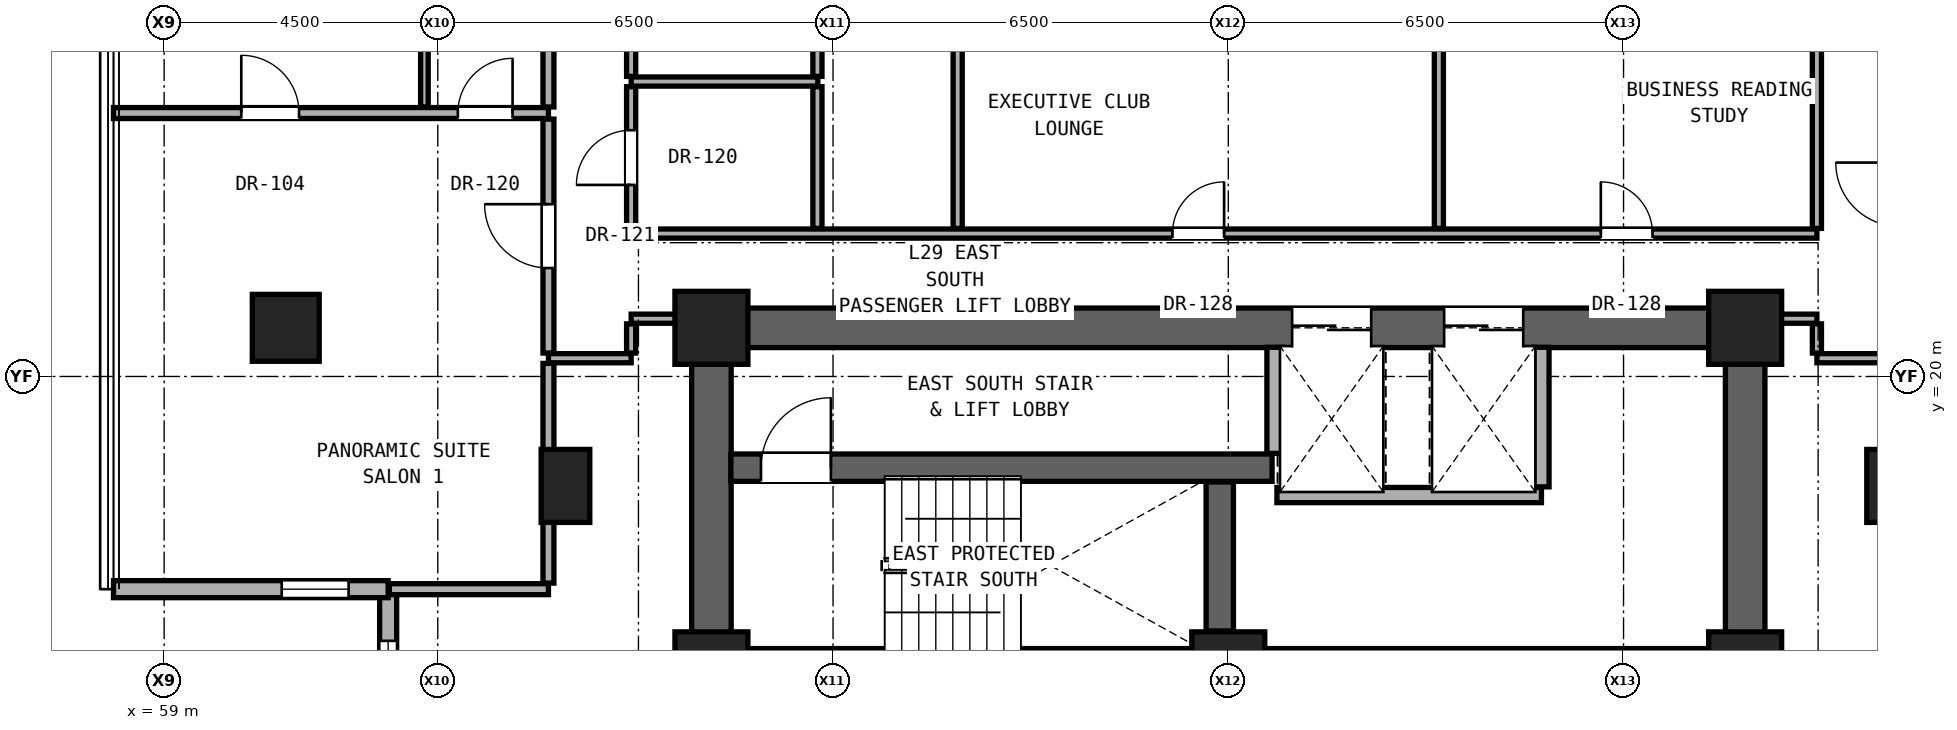
"""IFC4 building model, lengths in metres.
Left out: names, types, materials, properties, quantities, classifications, styles, units other than length and angle.
Written with IfcOpenShell. Run it as: python <this file> out.ifc"""

import sys

from ifc_helpers import new_model, si_unit, direction, frame, frame_2d, origin, origin_2d, place, context, subcontext, project, spatial, rectangle, hollow_rectangle, extrude, element, fill, save


model = new_model("IFC4")
c1 = context("Model", 3, precision=1e-05, world=origin(), true_north=direction((0.0, 1.0)))
c2 = subcontext(c1, "Body", "Model", "MODEL_VIEW")
j1 = project(units=[si_unit("LENGTHUNIT", "METRE"), si_unit("PLANEANGLEUNIT", "RADIAN")], contexts=[c1])
p1 = place(None, origin())
s1 = spatial("IfcSite", under=j1, at=p1, CompositionType="ELEMENT")
p2 = place(p1, origin())
s2 = spatial("IfcBuilding", under=s1, at=p2, CompositionType="ELEMENT")
p3 = place(p2, frame((0.0, 0.0, 104.9)))
s3 = spatial("IfcBuildingStorey", under=s2, at=p3, CompositionType="ELEMENT", Elevation=104.9)
for number, where, z_axis, x_axis in (
    (1, (68.0, 15.2, 0.0), (0.0, 0.0, 1.0), (1.0, 0.0, 0.0)),
    (2, (76.5, 15.2, 0.0), (0.0, 0.0, 1.0), (1.0, 0.0, 0.0)),
    (3, (85.0, 15.2, 0.0), (0.0, 0.0, 1.0), (1.0, 0.0, 0.0)),
    (4, (68.0, 20.8, 0.0), (0.0, 0.0, 1.0), (1.0, 0.0, 0.0)),
    (5, (85.0, 20.8, 0.0), (0.0, 0.0, 1.0), (1.0, 0.0, 0.0)),
):
    element("IfcColumn", number, at=place(p3, frame(where, z_axis=z_axis, x_axis=x_axis)), inside=s3, PredefinedType="COLUMN", context=c2, shape_type="SweptSolid", body=[
        extrude(rectangle(XDim=1.2, YDim=1.2, at=origin_2d()), origin(), (0.0, 0.0, 1.0), 3.3),
    ])
p4 = place(p3, frame((61.0, 20.8, 0.0), z_axis=(0.0, 0.0, 1.0), x_axis=(1.0, 0.0, 0.0)))
e6 = element("IfcColumn", 6, at=p4, inside=s3, PredefinedType="COLUMN", context=c2, shape_type="SweptSolid", body=[
    extrude(hollow_rectangle(XDim=1.1, YDim=1.1, WallThickness=0.06, at=origin_2d()), origin(), (0.0, 0.0, 1.0), 3.3),
])
for number, where, z_axis, x_axis in (
    (7, (65.6, 18.2, 0.0), (0.0, 0.0, 1.0), (1.0, 0.0, 0.0)),
    (8, (87.4, 18.2, 0.0), (0.0, 0.0, 1.0), (1.0, 0.0, 0.0)),
):
    element("IfcColumn", number, at=place(p3, frame(where, z_axis=z_axis, x_axis=x_axis)), inside=s3, PredefinedType="PILASTER", context=c2, shape_type="SweptSolid", body=[
        extrude(rectangle(XDim=0.8, YDim=1.2, at=origin_2d()), origin(), (0.0, 0.0, 1.0), 3.3),
    ])
p5 = place(p3, frame((68.0, 15.2, 0.0), z_axis=(0.0, 0.0, 1.0), x_axis=(1.0, 0.0, 0.0)))
e9 = element("IfcWall", 9, at=p5, inside=s3, PredefinedType="SHEAR", context=c2, shape_type="SweptSolid", body=[
    extrude(rectangle(XDim=17.0, YDim=0.65, at=frame_2d((8.5, 0.0))), origin(), (0.0, 0.0, 1.0), 3.08),
])
for number, where, z_axis, x_axis in (
    (10, (68.0, 15.2, 0.0), (0.0, 0.0, 1.0), (0.0, 1.0, 0.0)),
    (11, (85.0, 15.2, 0.0), (0.0, 0.0, 1.0), (0.0, 1.0, 0.0)),
):
    element("IfcWall", number, at=place(p3, frame(where, z_axis=z_axis, x_axis=x_axis)), inside=s3, PredefinedType="SHEAR", context=c2, shape_type="SweptSolid", body=[
        extrude(rectangle(XDim=5.6, YDim=0.65, at=frame_2d((2.8, 0.0))), origin(), (0.0, 0.0, 1.0), 3.08),
    ])
p6 = place(p3, frame((68.0, 20.8, 0.0), z_axis=(0.0, 0.0, 1.0), x_axis=(1.0, 0.0, 0.0)))
e12 = element("IfcWall", 12, at=p6, inside=s3, PredefinedType="SHEAR", context=c2, shape_type="SweptSolid", body=[
    extrude(rectangle(XDim=17.0, YDim=0.65, at=frame_2d((8.5, 0.0))), origin(), (0.0, 0.0, 1.0), 3.08),
])
p7 = place(p6, frame((9.55, 0.0, 0.0)))
e13 = element("IfcOpeningElement", 13, at=p7, cuts=e12, PredefinedType="OPENING", context=c2, shape_type="SweptSolid", body=[
    extrude(rectangle(XDim=1.3, YDim=2.3, at=frame_2d((0.65, 1.15))), frame((0.0, 0.335, 0.0), z_axis=(0.0, -1.0, 0.0), x_axis=(1.0, 0.0, 0.0)), (0.0, 0.0, 1.0), 0.67),
])
p8 = place(p6, frame((12.05, 0.0, 0.0)))
e14 = element("IfcOpeningElement", 14, at=p8, cuts=e12, PredefinedType="OPENING", context=c2, shape_type="SweptSolid", body=[
    extrude(rectangle(XDim=1.3, YDim=2.3, at=frame_2d((0.65, 1.15))), frame((0.0, 0.335, 0.0), z_axis=(0.0, -1.0, 0.0), x_axis=(1.0, 0.0, 0.0)), (0.0, 0.0, 1.0), 0.67),
])
p9 = place(p3, frame((62.684, 16.502, 0.0), z_axis=(0.0, 0.0, 1.0), x_axis=(0.0, -1.0, 0.0)))
e15 = element("IfcWall", 15, at=p9, inside=s3, PredefinedType="SOLIDWALL", context=c2, shape_type="SweptSolid", body=[
    extrude(rectangle(XDim=4.516, YDim=0.28, at=frame_2d((2.258, 0.0))), origin(), (0.0, 0.0, 1.0), 3.06),
])
p10 = place(p9, frame((0.85, 0.0, 0.81)))
e16 = element("IfcOpeningElement", 16, at=p10, cuts=e15, PredefinedType="OPENING", context=c2, shape_type="SweptSolid", body=[
    extrude(rectangle(XDim=1.2, YDim=2.1, at=frame_2d((0.6, 1.05))), frame((0.0, 0.15, 0.0), z_axis=(0.0, -1.0, 0.0), x_axis=(1.0, 0.0, 0.0)), (0.0, 0.0, 1.0), 0.3),
])
p11 = place(p3, frame((58.167, 16.502, 0.0), z_axis=(0.0, 0.0, 1.0), x_axis=(1.0, 0.0, 0.0)))
e17 = element("IfcWall", 17, at=p11, inside=s3, PredefinedType="SOLIDWALL", context=c2, shape_type="SweptSolid", body=[
    extrude(rectangle(XDim=4.516, YDim=0.28, at=frame_2d((2.258, 0.0))), origin(), (0.0, 0.0, 1.0), 3.06),
])
p12 = place(p11, frame((2.766, 0.0, 0.85)))
e18 = element("IfcOpeningElement", 18, at=p12, cuts=e17, PredefinedType="OPENING", context=c2, shape_type="SweptSolid", body=[
    extrude(rectangle(XDim=1.1, YDim=2.0, at=frame_2d((0.55, 1.0))), frame((0.0, 0.15, 0.0), z_axis=(0.0, -1.0, 0.0), x_axis=(1.0, 0.0, 0.0)), (0.0, 0.0, 1.0), 0.3),
])
p13 = place(p3, frame((62.704, 16.502, 0.0), z_axis=(0.0, 0.0, 1.0), x_axis=(1.0, 0.0, 0.0)))
e19 = element("IfcWall", 19, at=p13, inside=s3, PredefinedType="PARTITIONING", context=c2, shape_type="SweptSolid", body=[
    extrude(rectangle(XDim=2.616, YDim=0.18, at=frame_2d((1.308, 0.0))), origin(), (0.0, 0.0, 1.0), 3.08),
])
p14 = place(p3, frame((77.3, 18.05, 0.0), z_axis=(0.0, 0.0, 1.0), x_axis=(1.0, 0.0, 0.0)))
e20 = element("IfcWall", 20, at=p14, inside=s3, PredefinedType="SOLIDWALL", context=c2, shape_type="SweptSolid", body=[
    extrude(rectangle(XDim=4.35, YDim=0.25, at=frame_2d((2.175, 0.0))), origin(), (0.0, 0.0, 1.0), 3.08),
])
p15 = place(p3, frame((68.32, 18.5, 0.0), z_axis=(0.0, 0.0, 1.0), x_axis=(1.0, 0.0, 0.0)))
e21 = element("IfcWall", 21, at=p15, inside=s3, PredefinedType="SHEAR", context=c2, shape_type="SweptSolid", body=[
    extrude(rectangle(XDim=8.9, YDim=0.45, at=frame_2d((4.45, 0.0))), origin(), (0.0, 0.0, 1.0), 3.08),
])
p16 = place(p15, frame((0.495, 0.0, 0.0)))
e22 = element("IfcOpeningElement", 22, at=p16, cuts=e21, PredefinedType="OPENING", context=c2, shape_type="SweptSolid", body=[
    extrude(rectangle(XDim=1.15, YDim=2.2, at=frame_2d((0.575, 1.1))), frame((0.0, 0.235, 0.0), z_axis=(0.0, -1.0, 0.0), x_axis=(1.0, 0.0, 0.0)), (0.0, 0.0, 1.0), 0.47),
])
p17 = place(p3, frame((65.32, 20.3, 0.0), z_axis=(0.0, 0.0, 1.0), x_axis=(1.0, 0.0, 0.0)))
e23 = element("IfcWall", 23, at=p17, inside=s3, PredefinedType="PARTITIONING", context=c2, shape_type="SweptSolid", body=[
    extrude(rectangle(XDim=1.36, YDim=0.15, at=frame_2d((0.68, 0.0))), origin(), (0.0, 0.0, 1.0), 3.08),
])
p18 = place(p3, frame((86.18, 20.3, 0.0), z_axis=(0.0, 0.0, 1.0), x_axis=(1.0, 0.0, 0.0)))
e24 = element("IfcWall", 24, at=p18, inside=s3, PredefinedType="PARTITIONING", context=c2, shape_type="SweptSolid", body=[
    extrude(rectangle(XDim=1.36, YDim=0.15, at=frame_2d((0.68, 0.0))), origin(), (0.0, 0.0, 1.0), 3.08),
])
p19 = place(p3, frame((66.68, 20.95, 0.0), z_axis=(0.0, 0.0, 1.0), x_axis=(1.0, 0.0, 0.0)))
e25 = element("IfcWall", 25, at=p19, inside=s3, PredefinedType="PARTITIONING", context=c2, shape_type="SweptSolid", body=[
    extrude(rectangle(XDim=1.0, YDim=0.15, at=frame_2d((0.5, 0.0))), origin(), (0.0, 0.0, 1.0), 2.472),
])
p20 = place(p3, frame((85.32, 20.95, 0.0), z_axis=(0.0, 0.0, 1.0), x_axis=(1.0, 0.0, 0.0)))
e26 = element("IfcWall", 26, at=p20, inside=s3, PredefinedType="PARTITIONING", context=c2, shape_type="SweptSolid", body=[
    extrude(rectangle(XDim=0.86, YDim=0.15, at=frame_2d((0.43, 0.0))), origin(), (0.0, 0.0, 1.0), 2.472),
])
p21 = place(p3, frame((66.68, 22.35, 0.0), z_axis=(0.0, 0.0, 1.0), x_axis=(1.0, 0.0, 0.0)))
e27 = element("IfcWall", 27, at=p21, inside=s3, PredefinedType="PARTITIONING", context=c2, shape_type="SweptSolid", body=[
    extrude(rectangle(XDim=19.5, YDim=0.15, at=frame_2d((9.75, 0.0))), origin(), (0.0, 0.0, 1.0), 2.145),
])
p22 = place(p21, frame((8.902, 0.0, 0.0)))
e28 = element("IfcOpeningElement", 28, at=p22, cuts=e27, PredefinedType="OPENING", context=c2, shape_type="SweptSolid", body=[
    extrude(rectangle(XDim=0.85, YDim=2.01, at=frame_2d((0.425, 1.005))), frame((0.0, 0.085, 0.0), z_axis=(0.0, -1.0, 0.0), x_axis=(1.0, 0.0, 0.0)), (0.0, 0.0, 1.0), 0.17),
])
p23 = place(p21, frame((15.947, 0.0, 0.0)))
e29 = element("IfcOpeningElement", 29, at=p23, cuts=e27, PredefinedType="OPENING", context=c2, shape_type="SweptSolid", body=[
    extrude(rectangle(XDim=0.85, YDim=2.01, at=frame_2d((0.425, 1.005))), frame((0.0, 0.085, 0.0), z_axis=(0.0, -1.0, 0.0), x_axis=(1.0, 0.0, 0.0)), (0.0, 0.0, 1.0), 0.17),
])
p24 = place(p3, frame((58.167, 24.332, 0.0), z_axis=(0.0, 0.0, 1.0), x_axis=(1.0, 0.0, 0.0)))
e30 = element("IfcWall", 30, at=p24, inside=s3, PredefinedType="PARTITIONING", context=c2, shape_type="SweptSolid", body=[
    extrude(rectangle(XDim=7.153, YDim=0.18, at=frame_2d((3.577, 0.0))), origin(), (0.0, 0.0, 1.0), 2.216),
])
p25 = place(p24, frame((2.102, 0.0, 0.0)))
e31 = element("IfcOpeningElement", 31, at=p25, cuts=e30, PredefinedType="OPENING", context=c2, shape_type="SweptSolid", body=[
    extrude(rectangle(XDim=0.95, YDim=2.15, at=frame_2d((0.475, 1.075))), frame((0.0, 0.1, 0.0), z_axis=(0.0, -1.0, 0.0), x_axis=(1.0, 0.0, 0.0)), (0.0, 0.0, 1.0), 0.2),
])
p26 = place(p24, frame((5.663, 0.0, 0.0)))
e32 = element("IfcOpeningElement", 32, at=p26, cuts=e30, PredefinedType="OPENING", context=c2, shape_type="SweptSolid", body=[
    extrude(rectangle(XDim=0.9, YDim=2.1, at=frame_2d((0.45, 1.05))), frame((0.0, 0.1, 0.0), z_axis=(0.0, -1.0, 0.0), x_axis=(1.0, 0.0, 0.0)), (0.0, 0.0, 1.0), 0.2),
])
p27 = place(p3, frame((66.68, 24.85, 0.0), z_axis=(0.0, 0.0, 1.0), x_axis=(1.0, 0.0, 0.0)))
e33 = element("IfcWall", 33, at=p27, inside=s3, PredefinedType="PARTITIONING", context=c2, shape_type="SweptSolid", body=[
    extrude(rectangle(XDim=3.07, YDim=0.15, at=frame_2d((1.535, 0.0))), origin(), (0.0, 0.0, 1.0), 2.145),
])
p28 = place(p3, frame((63.28, 24.432, 0.0), z_axis=(0.0, 0.0, 1.0), x_axis=(0.0, 1.0, 0.0)))
e34 = element("IfcWall", 34, at=p28, inside=s3, PredefinedType="PARTITIONING", context=c2, shape_type="SweptSolid", body=[
    extrude(rectangle(XDim=2.128, YDim=0.125, at=frame_2d((1.064, 0.0))), origin(), (0.0, 0.0, 1.0), 3.08),
])
p29 = place(p3, frame((65.32, 16.602, 0.0), z_axis=(0.0, 0.0, 1.0), x_axis=(0.0, 1.0, 0.0)))
e35 = element("IfcWall", 35, at=p29, inside=s3, PredefinedType="PARTITIONING", context=c2, shape_type="SweptSolid", body=[
    extrude(rectangle(XDim=3.613, YDim=0.18, at=frame_2d((1.807, 0.0))), origin(), (0.0, 0.0, 1.0), 2.456),
])
p30 = place(p3, frame((65.32, 20.385, 0.0), z_axis=(0.0, 0.0, 1.0), x_axis=(0.0, 1.0, 0.0)))
e36 = element("IfcWall", 36, at=p30, inside=s3, PredefinedType="PARTITIONING", context=c2, shape_type="SweptSolid", body=[
    extrude(rectangle(XDim=3.847, YDim=0.18, at=frame_2d((1.923, 0.0))), origin(), (0.0, 0.0, 1.0), 2.472),
])
p31 = place(p30, frame((1.398, 0.0, 0.0)))
e37 = element("IfcOpeningElement", 37, at=p31, cuts=e36, PredefinedType="OPENING", context=c2, shape_type="SweptSolid", body=[
    extrude(rectangle(XDim=1.05, YDim=2.2, at=frame_2d((0.525, 1.1))), frame((0.0, 0.1, 0.0), z_axis=(0.0, -1.0, 0.0), x_axis=(1.0, 0.0, 0.0)), (0.0, 0.0, 1.0), 0.2),
])
p32 = place(p3, frame((65.32, 24.432, 0.0), z_axis=(0.0, 0.0, 1.0), x_axis=(0.0, 1.0, 0.0)))
e38 = element("IfcWall", 38, at=p32, inside=s3, PredefinedType="PARTITIONING", context=c2, shape_type="SweptSolid", body=[
    extrude(rectangle(XDim=2.128, YDim=0.18, at=frame_2d((1.064, 0.0))), origin(), (0.0, 0.0, 1.0), 3.08),
])
p33 = place(p3, frame((66.68, 20.385, 0.0), z_axis=(0.0, 0.0, 1.0), x_axis=(0.0, 1.0, 0.0)))
e39 = element("IfcWall", 39, at=p33, inside=s3, PredefinedType="PARTITIONING", context=c2, shape_type="SweptSolid", body=[
    extrude(rectangle(XDim=0.48, YDim=0.15, at=frame_2d((0.24, 0.0))), origin(), (0.0, 0.0, 1.0), 2.472),
])
p34 = place(p3, frame((66.68, 22.435, 0.0), z_axis=(0.0, 0.0, 1.0), x_axis=(0.0, 1.0, 0.0)))
e40 = element("IfcWall", 40, at=p34, inside=s3, PredefinedType="PARTITIONING", context=c2, shape_type="SweptSolid", body=[
    extrude(rectangle(XDim=2.33, YDim=0.15, at=frame_2d((1.165, 0.0))), origin(), (0.0, 0.0, 1.0), 3.08),
])
p35 = place(p34, frame((0.715, 0.0, 0.0)))
e41 = element("IfcOpeningElement", 41, at=p35, cuts=e40, PredefinedType="OPENING", context=c2, shape_type="SweptSolid", body=[
    extrude(rectangle(XDim=0.9, YDim=2.1, at=frame_2d((0.45, 1.05))), frame((0.0, 0.085, 0.0), z_axis=(0.0, -1.0, 0.0), x_axis=(1.0, 0.0, 0.0)), (0.0, 0.0, 1.0), 0.17),
])
p36 = place(p3, frame((66.68, 24.935, 0.0), z_axis=(0.0, 0.0, 1.0), x_axis=(0.0, 1.0, 0.0)))
e42 = element("IfcWall", 42, at=p36, inside=s3, PredefinedType="PARTITIONING", context=c2, shape_type="SweptSolid", body=[
    extrude(rectangle(XDim=5.63, YDim=0.15, at=frame_2d((2.815, 0.0))), origin(), (0.0, 0.0, 1.0), 2.299),
])
p37 = place(p36, frame((2.34, 0.0, 0.0)))
e43 = element("IfcOpeningElement", 43, at=p37, cuts=e42, PredefinedType="OPENING", context=c2, shape_type="SweptSolid", body=[
    extrude(rectangle(XDim=0.95, YDim=2.15, at=frame_2d((0.475, 1.075))), frame((0.0, 0.085, 0.0), z_axis=(0.0, -1.0, 0.0), x_axis=(1.0, 0.0, 0.0)), (0.0, 0.0, 1.0), 0.17),
])
p38 = place(p3, frame((69.743, 22.435, 0.0), z_axis=(0.0, 0.0, 1.0), x_axis=(0.0, 1.0, 0.0)))
e44 = element("IfcWall", 44, at=p38, inside=s3, PredefinedType="PARTITIONING", context=c2, shape_type="SweptSolid", body=[
    extrude(rectangle(XDim=2.33, YDim=0.15, at=frame_2d((1.165, 0.0))), origin(), (0.0, 0.0, 1.0), 3.08),
])
p39 = place(p3, frame((69.743, 24.935, 0.0), z_axis=(0.0, 0.0, 1.0), x_axis=(0.0, 1.0, 0.0)))
e45 = element("IfcWall", 45, at=p39, inside=s3, PredefinedType="PARTITIONING", context=c2, shape_type="SweptSolid", body=[
    extrude(rectangle(XDim=5.63, YDim=0.15, at=frame_2d((2.815, 0.0))), origin(), (0.0, 0.0, 1.0), 2.145),
])
p40 = place(p3, frame((72.05, 22.435, 0.0), z_axis=(0.0, 0.0, 1.0), x_axis=(0.0, 1.0, 0.0)))
e46 = element("IfcWall", 46, at=p40, inside=s3, PredefinedType="PARTITIONING", context=c2, shape_type="SweptSolid", body=[
    extrude(rectangle(XDim=3.565, YDim=0.15, at=frame_2d((1.782, 0.0))), origin(), (0.0, 0.0, 1.0), 2.609),
])
p41 = place(p3, frame((76.36, 15.815, 0.0), z_axis=(0.0, 0.0, 1.0), x_axis=(0.0, 1.0, 0.0)))
e47 = element("IfcWall", 47, at=p41, inside=s3, PredefinedType="SHEAR", context=c2, shape_type="SweptSolid", body=[
    extrude(rectangle(XDim=2.45, YDim=0.45, at=frame_2d((1.225, 0.0))), origin(), (0.0, 0.0, 1.0), 3.08),
])
p42 = place(p3, frame((77.26, 18.735, 0.0), z_axis=(0.0, 0.0, 1.0), x_axis=(0.0, 1.0, 0.0)))
e48 = element("IfcWall", 48, at=p42, inside=s3, PredefinedType="SOLIDWALL", context=c2, shape_type="SweptSolid", body=[
    extrude(rectangle(XDim=1.745, YDim=0.25, at=frame_2d((0.873, 0.0))), origin(), (0.0, 0.0, 1.0), 3.08),
])
p43 = place(p3, frame((79.963, 22.435, 0.0), z_axis=(0.0, 0.0, 1.0), x_axis=(0.0, 1.0, 0.0)))
e49 = element("IfcWall", 49, at=p43, inside=s3, PredefinedType="PARTITIONING", context=c2, shape_type="SweptSolid", body=[
    extrude(rectangle(XDim=3.565, YDim=0.15, at=frame_2d((1.782, 0.0))), origin(), (0.0, 0.0, 1.0), 3.08),
])
p44 = place(p3, frame((81.65, 18.185, 0.0), z_axis=(0.0, 0.0, 1.0), x_axis=(0.0, 1.0, 0.0)))
e50 = element("IfcWall", 50, at=p44, inside=s3, PredefinedType="SOLIDWALL", context=c2, shape_type="SweptSolid", body=[
    extrude(rectangle(XDim=2.295, YDim=0.25, at=frame_2d((1.147, 0.0))), origin(), (0.0, 0.0, 1.0), 3.08),
])
p45 = place(p3, frame((86.18, 20.385, 0.0), z_axis=(0.0, 0.0, 1.0), x_axis=(0.0, 1.0, 0.0)))
e51 = element("IfcWall", 51, at=p45, inside=s3, PredefinedType="PARTITIONING", context=c2, shape_type="SweptSolid", body=[
    extrude(rectangle(XDim=0.48, YDim=0.15, at=frame_2d((0.24, 0.0))), origin(), (0.0, 0.0, 1.0), 2.472),
])
p46 = place(p3, frame((86.18, 22.435, 0.0), z_axis=(0.0, 0.0, 1.0), x_axis=(0.0, 1.0, 0.0)))
e52 = element("IfcWall", 52, at=p46, inside=s3, PredefinedType="PARTITIONING", context=c2, shape_type="SweptSolid", body=[
    extrude(rectangle(XDim=3.565, YDim=0.15, at=frame_2d((1.782, 0.0))), origin(), (0.0, 0.0, 1.0), 3.08),
])
p47 = place(p10, origin())
e53 = element("IfcWindow", 53, at=p47, inside=s3, PartitioningType="SINGLE_PANEL", PredefinedType="WINDOW", context=c2, shape_type="SweptSolid", body=[
    extrude(rectangle(XDim=1.2, YDim=2.1, at=frame_2d((0.6, 1.05))), frame((0.0, 0.03, 0.0), z_axis=(0.0, -1.0, 0.0), x_axis=(1.0, 0.0, 0.0)), (0.0, 0.0, 1.0), 0.06),
])
fill(e16, e53)
p48 = place(p12, origin())
e54 = element("IfcWindow", 54, at=p48, inside=s3, PartitioningType="SINGLE_PANEL", PredefinedType="WINDOW", context=c2, shape_type="SweptSolid", body=[
    extrude(rectangle(XDim=1.1, YDim=2.0, at=frame_2d((0.55, 1.0))), frame((0.0, 0.03, 0.0), z_axis=(0.0, -1.0, 0.0), x_axis=(1.0, 0.0, 0.0)), (0.0, 0.0, 1.0), 0.06),
])
fill(e18, e54)
p49 = place(p16, origin())
e55 = element("IfcDoor", 55, at=p49, inside=s3, OperationType="SINGLE_SWING_RIGHT", PredefinedType="DOOR", context=c2, shape_type="SweptSolid", body=[
    extrude(rectangle(XDim=1.15, YDim=2.2, at=frame_2d((0.575, 1.1))), frame((0.0, 0.025, 0.0), z_axis=(0.0, -1.0, 0.0), x_axis=(1.0, 0.0, 0.0)), (0.0, 0.0, 1.0), 0.05),
])
fill(e22, e55)
p50 = place(p35, origin())
e56 = element("IfcDoor", 56, at=p50, inside=s3, OperationType="SINGLE_SWING_LEFT", PredefinedType="DOOR", context=c2, shape_type="SweptSolid", body=[
    extrude(rectangle(XDim=0.9, YDim=2.1, at=frame_2d((0.45, 1.05))), frame((0.0, 0.025, 0.0), z_axis=(0.0, -1.0, 0.0), x_axis=(1.0, 0.0, 0.0)), (0.0, 0.0, 1.0), 0.05),
])
fill(e41, e56)
p51 = place(p31, origin())
e57 = element("IfcDoor", 57, at=p51, inside=s3, OperationType="SINGLE_SWING_RIGHT", PredefinedType="DOOR", context=c2, shape_type="SweptSolid", body=[
    extrude(rectangle(XDim=1.05, YDim=2.2, at=frame_2d((0.525, 1.1))), frame((0.0, 0.025, 0.0), z_axis=(0.0, -1.0, 0.0), x_axis=(1.0, 0.0, 0.0)), (0.0, 0.0, 1.0), 0.05),
])
fill(e37, e57)
p52 = place(p25, origin())
e58 = element("IfcDoor", 58, at=p52, inside=s3, OperationType="SINGLE_SWING_LEFT", PredefinedType="DOOR", context=c2, shape_type="SweptSolid", body=[
    extrude(rectangle(XDim=0.95, YDim=2.15, at=frame_2d((0.475, 1.075))), frame((0.0, 0.025, 0.0), z_axis=(0.0, -1.0, 0.0), x_axis=(1.0, 0.0, 0.0)), (0.0, 0.0, 1.0), 0.05),
])
fill(e31, e58)
p53 = place(p26, origin())
e59 = element("IfcDoor", 59, at=p53, inside=s3, OperationType="SINGLE_SWING_RIGHT", PredefinedType="DOOR", context=c2, shape_type="SweptSolid", body=[
    extrude(rectangle(XDim=0.9, YDim=2.1, at=frame_2d((0.45, 1.05))), frame((0.0, 0.025, 0.0), z_axis=(0.0, -1.0, 0.0), x_axis=(1.0, 0.0, 0.0)), (0.0, 0.0, 1.0), 0.05),
])
fill(e32, e59)
p54 = place(p22, origin())
e60 = element("IfcDoor", 60, at=p54, inside=s3, OperationType="SINGLE_SWING_RIGHT", PredefinedType="DOOR", context=c2, shape_type="SweptSolid", body=[
    extrude(rectangle(XDim=0.85, YDim=2.01, at=frame_2d((0.425, 1.005))), frame((0.0, 0.025, 0.0), z_axis=(0.0, -1.0, 0.0), x_axis=(1.0, 0.0, 0.0)), (0.0, 0.0, 1.0), 0.05),
])
fill(e28, e60)
p55 = place(p23, origin())
e61 = element("IfcDoor", 61, at=p55, inside=s3, OperationType="SINGLE_SWING_LEFT", PredefinedType="DOOR", context=c2, shape_type="SweptSolid", body=[
    extrude(rectangle(XDim=0.85, YDim=2.01, at=frame_2d((0.425, 1.005))), frame((0.0, 0.025, 0.0), z_axis=(0.0, -1.0, 0.0), x_axis=(1.0, 0.0, 0.0)), (0.0, 0.0, 1.0), 0.05),
])
fill(e29, e61)
p56 = place(p7, origin())
e62 = element("IfcDoor", 62, at=p56, inside=s3, OperationType="DOUBLE_DOOR_SLIDING", PredefinedType="DOOR", context=c2, shape_type="SweptSolid", body=[
    extrude(rectangle(XDim=1.3, YDim=2.3, at=frame_2d((0.65, 1.15))), frame((0.0, 0.025, 0.0), z_axis=(0.0, -1.0, 0.0), x_axis=(1.0, 0.0, 0.0)), (0.0, 0.0, 1.0), 0.05),
])
fill(e13, e62)
p57 = place(p8, origin())
e63 = element("IfcDoor", 63, at=p57, inside=s3, OperationType="DOUBLE_DOOR_SLIDING", PredefinedType="DOOR", context=c2, shape_type="SweptSolid", body=[
    extrude(rectangle(XDim=1.3, YDim=2.3, at=frame_2d((0.65, 1.15))), frame((0.0, 0.025, 0.0), z_axis=(0.0, -1.0, 0.0), x_axis=(1.0, 0.0, 0.0)), (0.0, 0.0, 1.0), 0.05),
])
fill(e14, e63)
save(model, sys.argv[1])
